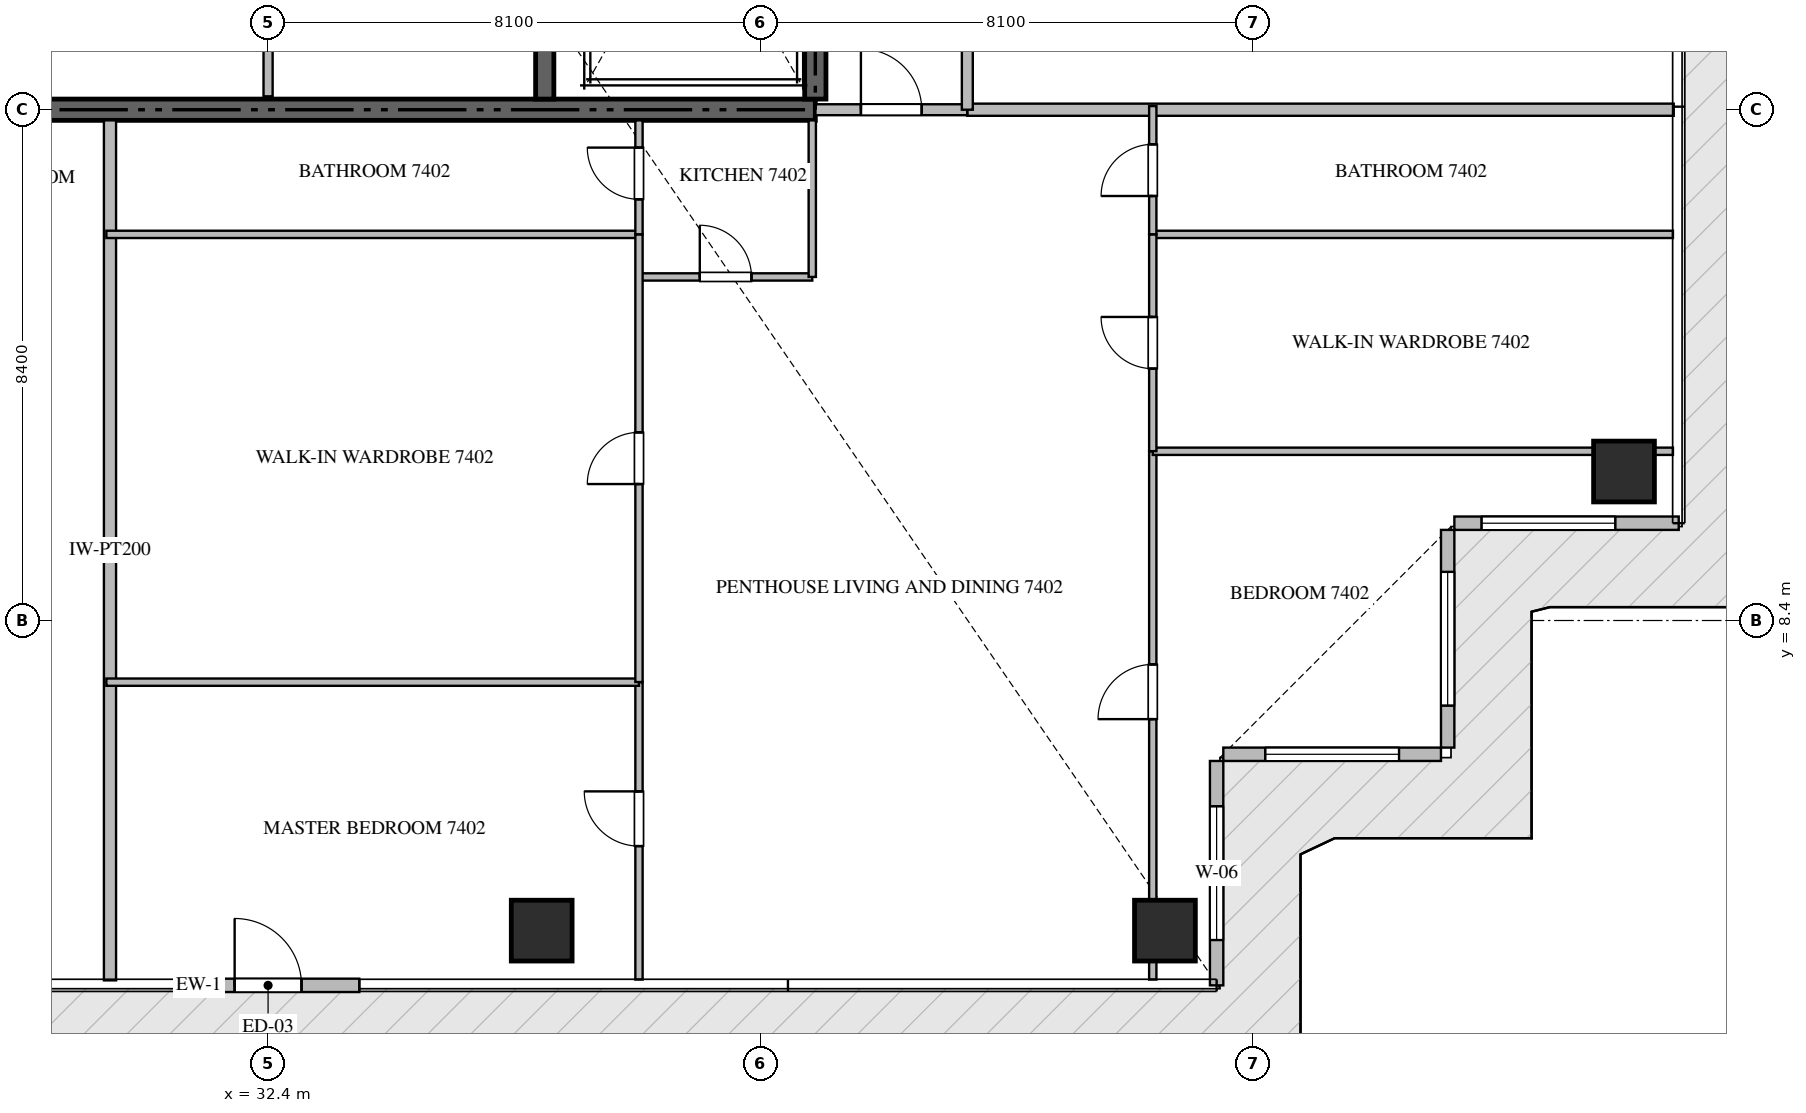
"""IFC4 building model, lengths in metres.
Left out: names, types, materials, properties, quantities, classifications, styles, units other than length and angle.
Written with IfcOpenShell. Run it as: python <this file> out.ifc"""

import sys

from ifc_helpers import new_model, si_unit, direction, frame, frame_2d, origin, origin_2d, place, context, subcontext, project, spatial, rectangle, extrude, source, transform, mapped, element, fill, save


model = new_model("IFC4")
c1 = context("Model", 3, precision=1e-05, world=origin(), true_north=direction((0.0, 1.0)))
c2 = subcontext(c1, "Body", "Model", "MODEL_VIEW")
j1 = project(units=[si_unit("LENGTHUNIT", "METRE"), si_unit("PLANEANGLEUNIT", "RADIAN")], contexts=[c1])
p1 = place(None, origin())
s1 = spatial("IfcSite", under=j1, at=p1, CompositionType="ELEMENT")
p2 = place(p1, origin())
s2 = spatial("IfcBuilding", under=s1, at=p2, CompositionType="ELEMENT")
p3 = place(p2, frame((0.0, 0.0, 297.5)))
s3 = spatial("IfcBuildingStorey", under=s2, at=p3, CompositionType="ELEMENT", Elevation=297.5)
p4 = place(p3, frame((23.4, 16.8, -0.26), z_axis=(0.0, 0.0, 1.0), x_axis=(1.0, 0.0, 0.0)))
e1 = element("IfcWall", 1, at=p4, inside=s3, PredefinedType="SHEAR", context=c2, shape_type="SweptSolid", body=[
    extrude(rectangle(XDim=18.0, YDim=0.35, at=frame_2d((9.0, 0.0))), origin(), (0.0, 0.0, 1.0), 4.048),
])
p5 = place(p3, frame((41.4, 16.975, -0.26), z_axis=(0.0, 0.0, 1.0), x_axis=(0.0, 1.0, 0.0)))
e2 = element("IfcWall", 2, at=p5, inside=s3, PredefinedType="SHEAR", context=c2, shape_type="SweptSolid", body=[
    extrude(rectangle(XDim=8.375, YDim=0.35, at=frame_2d((4.188, 0.0))), origin(), (0.0, 0.0, 1.0), 4.048),
])
p6 = place(p3, frame((36.95, 16.975, -0.26), z_axis=(0.0, 0.0, 1.0), x_axis=(0.0, 1.0, 0.0)))
e3 = element("IfcWall", 3, at=p6, inside=s3, PredefinedType="SHEAR", context=c2, shape_type="SweptSolid", body=[
    extrude(rectangle(XDim=8.375, YDim=0.3, at=frame_2d((4.188, 0.0))), origin(), (0.0, 0.0, 1.0), 4.048),
])
m1 = source(origin(), c2, "Body", "SweptSolid", [
    extrude(rectangle(XDim=1.0, YDim=1.0, at=origin_2d()), origin(), (0.0, 0.0, 1.0), 4.05),
])
for number, where, z_axis, x_axis in (
    (4, (36.9, 3.3, -0.26), (0.0, 0.0, 1.0), (1.0, 0.0, 0.0)),
    (5, (47.15, 3.3, -0.26), (0.0, 0.0, 1.0), (1.0, 0.0, 0.0)),
    (6, (54.7, 10.85, -0.26), (0.0, 0.0, 1.0), (1.0, 0.0, 0.0)),
):
    element("IfcColumn", number, at=place(p3, frame(where, z_axis=z_axis, x_axis=x_axis)), inside=s3, PredefinedType="COLUMN", context=c2, shape_type="MappedRepresentation", body=[
        mapped(m1, transform((0.0, 0.0, 0.0), scale=1.0)),
    ])
p7 = place(p3, frame((30.9, 2.4, 0.0), z_axis=(0.0, 0.0, 1.0), x_axis=(1.0, 0.0, 0.0)))
e7 = element("IfcWall", 7, at=p7, inside=s3, PredefinedType="ELEMENTEDWALL", context=c2, shape_type="SweptSolid", body=[
    extrude(rectangle(XDim=3.0, YDim=0.22, at=frame_2d((1.5, 0.0))), origin(), (0.0, 0.0, 1.0), 3.775),
])
p8 = place(p7, frame((0.95, 0.0, 0.0)))
e8 = element("IfcOpeningElement", 8, at=p8, cuts=e7, PredefinedType="OPENING", context=c2, shape_type="SweptSolid", body=[
    extrude(rectangle(XDim=1.1, YDim=2.2, at=frame_2d((0.55, 1.1))), frame((0.0, 0.12, 0.0), z_axis=(0.0, -1.0, 0.0), x_axis=(1.0, 0.0, 0.0)), (0.0, 0.0, 1.0), 0.24),
])
p9 = place(p3, frame((48.0, 2.4, 0.0), z_axis=(0.0, 0.0, 1.0), x_axis=(0.0, 1.0, 0.0)))
e9 = element("IfcWall", 9, at=p9, inside=s3, PredefinedType="ELEMENTEDWALL", context=c2, shape_type="SweptSolid", body=[
    extrude(rectangle(XDim=3.69, YDim=0.22, at=frame_2d((1.845, 0.0))), origin(), (0.0, 0.0, 1.0), 3.775),
])
p10 = place(p9, frame((0.745, 0.0, 0.65)))
e10 = element("IfcOpeningElement", 10, at=p10, cuts=e9, PredefinedType="OPENING", context=c2, shape_type="SweptSolid", body=[
    extrude(rectangle(XDim=2.2, YDim=2.4, at=frame_2d((1.1, 1.2))), frame((0.0, 0.12, 0.0), z_axis=(0.0, -1.0, 0.0), x_axis=(1.0, 0.0, 0.0)), (0.0, 0.0, 1.0), 0.24),
])
p11 = place(p3, frame((48.11, 6.2, 0.0), z_axis=(0.0, 0.0, 1.0), x_axis=(1.0, 0.0, 0.0)))
e11 = element("IfcWall", 11, at=p11, inside=s3, PredefinedType="ELEMENTEDWALL", context=c2, shape_type="SweptSolid", body=[
    extrude(rectangle(XDim=3.58, YDim=0.22, at=frame_2d((1.79, 0.0))), origin(), (0.0, 0.0, 1.0), 3.775),
])
p12 = place(p11, frame((0.69, 0.0, 0.65)))
e12 = element("IfcOpeningElement", 12, at=p12, cuts=e11, PredefinedType="OPENING", context=c2, shape_type="SweptSolid", body=[
    extrude(rectangle(XDim=2.2, YDim=2.4, at=frame_2d((1.1, 1.2))), frame((0.0, 0.12, 0.0), z_axis=(0.0, -1.0, 0.0), x_axis=(1.0, 0.0, 0.0)), (0.0, 0.0, 1.0), 0.24),
])
p13 = place(p3, frame((51.8, 6.31, 0.0), z_axis=(0.0, 0.0, 1.0), x_axis=(0.0, 1.0, 0.0)))
e13 = element("IfcWall", 13, at=p13, inside=s3, PredefinedType="ELEMENTEDWALL", context=c2, shape_type="SweptSolid", body=[
    extrude(rectangle(XDim=3.58, YDim=0.22, at=frame_2d((1.79, 0.0))), origin(), (0.0, 0.0, 1.0), 3.775),
])
p14 = place(p13, frame((0.69, 0.0, 0.65)))
e14 = element("IfcOpeningElement", 14, at=p14, cuts=e13, PredefinedType="OPENING", context=c2, shape_type="SweptSolid", body=[
    extrude(rectangle(XDim=2.2, YDim=2.4, at=frame_2d((1.1, 1.2))), frame((0.0, 0.12, 0.0), z_axis=(0.0, -1.0, 0.0), x_axis=(1.0, 0.0, 0.0)), (0.0, 0.0, 1.0), 0.24),
])
p15 = place(p3, frame((51.91, 10.0, 0.0), z_axis=(0.0, 0.0, 1.0), x_axis=(1.0, 0.0, 0.0)))
e15 = element("IfcWall", 15, at=p15, inside=s3, PredefinedType="ELEMENTEDWALL", context=c2, shape_type="SweptSolid", body=[
    extrude(rectangle(XDim=3.69, YDim=0.22, at=frame_2d((1.845, 0.0))), origin(), (0.0, 0.0, 1.0), 3.775),
])
p16 = place(p15, frame((0.447, 0.0, 0.65)))
e16 = element("IfcOpeningElement", 16, at=p16, cuts=e15, PredefinedType="OPENING", context=c2, shape_type="SweptSolid", body=[
    extrude(rectangle(XDim=2.2, YDim=2.4, at=frame_2d((1.1, 1.2))), frame((0.0, 0.12, 0.0), z_axis=(0.0, -1.0, 0.0), x_axis=(1.0, 0.0, 0.0)), (0.0, 0.0, 1.0), 0.24),
])
p17 = place(p3, frame((32.4, 17.02, 0.0), z_axis=(0.0, 0.0, 1.0), x_axis=(0.0, 1.0, 0.0)))
e17 = element("IfcWall", 17, at=p17, inside=s3, PredefinedType="PARTITIONING", context=c2, shape_type="SweptSolid", body=[
    extrude(rectangle(XDim=2.73, YDim=0.15, at=frame_2d((1.365, 0.0))), origin(), (0.0, 0.0, 1.0), 3.79),
])
p18 = place(p3, frame((29.8, 2.482, 0.0), z_axis=(0.0, 0.0, 1.0), x_axis=(0.0, 1.0, 0.0)))
e18 = element("IfcWall", 18, at=p18, inside=s3, PredefinedType="PARTITIONING", context=c2, shape_type="SweptSolid", body=[
    extrude(rectangle(XDim=14.143, YDim=0.2, at=frame_2d((7.072, 0.0))), origin(), (0.0, 0.0, 1.0), 3.79),
])
p19 = place(p3, frame((43.9, 16.8, 0.0), z_axis=(0.0, 0.0, 1.0), x_axis=(1.0, 0.0, 0.0)))
e19 = element("IfcWall", 19, at=p19, inside=s3, PredefinedType="PARTITIONING", context=c2, shape_type="SweptSolid", body=[
    extrude(rectangle(XDim=11.618, YDim=0.2, at=frame_2d((5.809, 0.0))), origin(), (0.0, 0.0, 1.0), 3.79),
])
p20 = place(p3, frame((41.402, 16.8, 0.0), z_axis=(0.0, 0.0, 1.0), x_axis=(1.0, 0.0, 0.0)))
e20 = element("IfcWall", 20, at=p20, inside=s3, PredefinedType="PARTITIONING", context=c2, shape_type="SweptSolid", body=[
    extrude(rectangle(XDim=2.496, YDim=0.18, at=frame_2d((1.248, 0.0))), origin(), (0.0, 0.0, 1.0), 3.79),
])
p21 = place(p20, frame((0.748, 0.0, 0.0)))
e21 = element("IfcOpeningElement", 21, at=p21, cuts=e20, PredefinedType="OPENING", context=c2, shape_type="SweptSolid", body=[
    extrude(rectangle(XDim=1.0, YDim=2.15, at=frame_2d((0.5, 1.075))), frame((0.0, 0.1, 0.0), z_axis=(0.0, -1.0, 0.0), x_axis=(1.0, 0.0, 0.0)), (0.0, 0.0, 1.0), 0.2),
])
p22 = place(p3, frame((43.9, 16.8, 0.0), z_axis=(0.0, 0.0, 1.0), x_axis=(0.0, 1.0, 0.0)))
e22 = element("IfcWall", 22, at=p22, inside=s3, PredefinedType="PARTITIONING", context=c2, shape_type="SweptSolid", body=[
    extrude(rectangle(XDim=16.8, YDim=0.18, at=frame_2d((8.4, 0.0))), origin(), (0.0, 0.0, 1.0), 3.79),
])
p23 = place(p22, frame((1.3, 0.0, 0.0)))
e23 = element("IfcOpeningElement", 23, at=p23, cuts=e22, PredefinedType="OPENING", context=c2, shape_type="SweptSolid", body=[
    extrude(rectangle(XDim=1.0, YDim=2.15, at=frame_2d((0.5, 1.075))), frame((0.0, 0.1, 0.0), z_axis=(0.0, -1.0, 0.0), x_axis=(1.0, 0.0, 0.0)), (0.0, 0.0, 1.0), 0.2),
])
p24 = place(p3, frame((38.5, 14.05, 0.0), z_axis=(0.0, 0.0, 1.0), x_axis=(1.0, 0.0, 0.0)))
e24 = element("IfcWall", 24, at=p24, inside=s3, PredefinedType="PARTITIONING", context=c2, shape_type="SweptSolid", body=[
    extrude(rectangle(XDim=2.85, YDim=0.12, at=frame_2d((1.425, 0.0))), origin(), (0.0, 0.0, 1.0), 3.79),
])
p25 = place(p24, frame((1.0, 0.0, 0.0)))
e25 = element("IfcOpeningElement", 25, at=p25, cuts=e24, PredefinedType="OPENING", context=c2, shape_type="SweptSolid", body=[
    extrude(rectangle(XDim=0.85, YDim=2.1, at=frame_2d((0.425, 1.05))), frame((0.0, 0.07, 0.0), z_axis=(0.0, -1.0, 0.0), x_axis=(1.0, 0.0, 0.0)), (0.0, 0.0, 1.0), 0.14),
])
p26 = place(p3, frame((41.35, 14.05, 0.0), z_axis=(0.0, 0.0, 1.0), x_axis=(0.0, 1.0, 0.0)))
e26 = element("IfcWall", 26, at=p26, inside=s3, PredefinedType="PARTITIONING", context=c2, shape_type="SweptSolid", body=[
    extrude(rectangle(XDim=2.575, YDim=0.12, at=frame_2d((1.288, 0.0))), origin(), (0.0, 0.0, 1.0), 3.79),
])
p27 = place(p3, frame((38.5, 2.495, 0.0), z_axis=(0.0, 0.0, 1.0), x_axis=(0.0, 1.0, 0.0)))
e27 = element("IfcWall", 27, at=p27, inside=s3, PredefinedType="PARTITIONING", context=c2, shape_type="SweptSolid", body=[
    extrude(rectangle(XDim=4.891, YDim=0.12, at=frame_2d((2.445, 0.0))), origin(), (0.0, 0.0, 1.0), 3.79),
])
p28 = place(p27, frame((2.195, 0.0, 0.0)))
e28 = element("IfcOpeningElement", 28, at=p28, cuts=e27, PredefinedType="OPENING", context=c2, shape_type="SweptSolid", body=[
    extrude(rectangle(XDim=0.9, YDim=2.1, at=frame_2d((0.45, 1.05))), frame((0.0, 0.07, 0.0), z_axis=(0.0, -1.0, 0.0), x_axis=(1.0, 0.0, 0.0)), (0.0, 0.0, 1.0), 0.14),
])
for number, where, z_axis, x_axis in (
    (29, (29.74, 7.386, 0.0), (0.0, 0.0, 1.0), (1.0, 0.0, 0.0)),
    (30, (29.74, 14.75, 0.0), (0.0, 0.0, 1.0), (1.0, 0.0, 0.0)),
):
    element("IfcWall", number, at=place(p3, frame(where, z_axis=z_axis, x_axis=x_axis)), inside=s3, PredefinedType="PARTITIONING", context=c2, shape_type="SweptSolid", body=[
        extrude(rectangle(XDim=8.76, YDim=0.12, at=frame_2d((4.38, 0.0))), origin(), (0.0, 0.0, 1.0), 3.79),
    ])
p29 = place(p3, frame((38.5, 7.388, 0.0), z_axis=(0.0, 0.0, 1.0), x_axis=(0.0, 1.0, 0.0)))
e31 = element("IfcWall", 31, at=p29, inside=s3, PredefinedType="PARTITIONING", context=c2, shape_type="SweptSolid", body=[
    extrude(rectangle(XDim=7.362, YDim=0.12, at=frame_2d((3.681, 0.0))), origin(), (0.0, 0.0, 1.0), 3.79),
])
p30 = place(p29, frame((3.256, 0.0, 0.0)))
e32 = element("IfcOpeningElement", 32, at=p30, cuts=e31, PredefinedType="OPENING", context=c2, shape_type="SweptSolid", body=[
    extrude(rectangle(XDim=0.85, YDim=2.1, at=frame_2d((0.425, 1.05))), frame((0.0, 0.07, 0.0), z_axis=(0.0, -1.0, 0.0), x_axis=(1.0, 0.0, 0.0)), (0.0, 0.0, 1.0), 0.14),
])
p31 = place(p3, frame((38.5, 14.752, 0.0), z_axis=(0.0, 0.0, 1.0), x_axis=(0.0, 1.0, 0.0)))
e33 = element("IfcWall", 33, at=p31, inside=s3, PredefinedType="PARTITIONING", context=c2, shape_type="SweptSolid", body=[
    extrude(rectangle(XDim=1.873, YDim=0.12, at=frame_2d((0.937, 0.0))), origin(), (0.0, 0.0, 1.0), 3.79),
])
p32 = place(p31, frame((0.575, 0.0, 0.0)))
e34 = element("IfcOpeningElement", 34, at=p32, cuts=e33, PredefinedType="OPENING", context=c2, shape_type="SweptSolid", body=[
    extrude(rectangle(XDim=0.85, YDim=2.1, at=frame_2d((0.425, 1.05))), frame((0.0, 0.07, 0.0), z_axis=(0.0, -1.0, 0.0), x_axis=(1.0, 0.0, 0.0)), (0.0, 0.0, 1.0), 0.14),
])
p33 = place(p3, frame((46.95, 2.495, 0.0), z_axis=(0.0, 0.0, 1.0), x_axis=(0.0, 1.0, 0.0)))
e35 = element("IfcWall", 35, at=p33, inside=s3, PredefinedType="PARTITIONING", context=c2, shape_type="SweptSolid", body=[
    extrude(rectangle(XDim=8.688, YDim=0.12, at=frame_2d((4.344, 0.0))), origin(), (0.0, 0.0, 1.0), 3.292),
])
p34 = place(p33, frame((4.283, 0.0, 0.0)))
e36 = element("IfcOpeningElement", 36, at=p34, cuts=e35, PredefinedType="OPENING", context=c2, shape_type="SweptSolid", body=[
    extrude(rectangle(XDim=0.9, YDim=2.1, at=frame_2d((0.45, 1.05))), frame((0.0, 0.07, 0.0), z_axis=(0.0, -1.0, 0.0), x_axis=(1.0, 0.0, 0.0)), (0.0, 0.0, 1.0), 0.14),
])
for number, where, z_axis, x_axis in (
    (37, (46.95, 11.183, 0.0), (0.0, 0.0, 1.0), (1.0, 0.0, 0.0)),
    (38, (46.95, 14.75, 0.0), (0.0, 0.0, 1.0), (1.0, 0.0, 0.0)),
):
    element("IfcWall", number, at=place(p3, frame(where, z_axis=z_axis, x_axis=x_axis)), inside=s3, PredefinedType="PARTITIONING", context=c2, shape_type="SweptSolid", body=[
        extrude(rectangle(XDim=8.555, YDim=0.12, at=frame_2d((4.277, 0.0))), origin(), (0.0, 0.0, 1.0), 3.79),
    ])
p35 = place(p3, frame((46.95, 11.185, 0.0), z_axis=(0.0, 0.0, 1.0), x_axis=(0.0, 1.0, 0.0)))
e39 = element("IfcWall", 39, at=p35, inside=s3, PredefinedType="PARTITIONING", context=c2, shape_type="SweptSolid", body=[
    extrude(rectangle(XDim=3.565, YDim=0.12, at=frame_2d((1.782, 0.0))), origin(), (0.0, 0.0, 1.0), 3.372),
])
p36 = place(p35, frame((1.357, 0.0, 0.0)))
e40 = element("IfcOpeningElement", 40, at=p36, cuts=e39, PredefinedType="OPENING", context=c2, shape_type="SweptSolid", body=[
    extrude(rectangle(XDim=0.85, YDim=2.1, at=frame_2d((0.425, 1.05))), frame((0.0, 0.07, 0.0), z_axis=(0.0, -1.0, 0.0), x_axis=(1.0, 0.0, 0.0)), (0.0, 0.0, 1.0), 0.14),
])
p37 = place(p3, frame((46.95, 14.752, 0.0), z_axis=(0.0, 0.0, 1.0), x_axis=(0.0, 1.0, 0.0)))
e41 = element("IfcWall", 41, at=p37, inside=s3, PredefinedType="PARTITIONING", context=c2, shape_type="SweptSolid", body=[
    extrude(rectangle(XDim=2.108, YDim=0.12, at=frame_2d((1.054, 0.0))), origin(), (0.0, 0.0, 1.0), 3.372),
])
p38 = place(p37, frame((0.629, 0.0, 0.0)))
e42 = element("IfcOpeningElement", 42, at=p38, cuts=e41, PredefinedType="OPENING", context=c2, shape_type="SweptSolid", body=[
    extrude(rectangle(XDim=0.85, YDim=2.1, at=frame_2d((0.425, 1.05))), frame((0.0, 0.07, 0.0), z_axis=(0.0, -1.0, 0.0), x_axis=(1.0, 0.0, 0.0)), (0.0, 0.0, 1.0), 0.14),
])
m2 = source(origin(), c2, "Body", "SweptSolid", [
    extrude(rectangle(XDim=1.1, YDim=2.2, at=frame_2d((0.55, 1.1))), frame((0.0, 0.025, 0.0), z_axis=(0.0, -1.0, 0.0), x_axis=(1.0, 0.0, 0.0)), (0.0, 0.0, 1.0), 0.05),
])
p39 = place(p8, origin())
e43 = element("IfcDoor", 43, at=p39, inside=s3, OperationType="SINGLE_SWING_LEFT", PredefinedType="DOOR", context=c2, shape_type="MappedRepresentation", body=[
    mapped(m2, transform((0.0, 0.0, 0.0), scale=1.0)),
])
fill(e8, e43)
m3 = source(origin(), c2, "Body", "SweptSolid", [
    extrude(rectangle(XDim=2.2, YDim=2.4, at=frame_2d((1.1, 1.2))), frame((0.0, 0.03, 0.0), z_axis=(0.0, -1.0, 0.0), x_axis=(1.0, 0.0, 0.0)), (0.0, 0.0, 1.0), 0.06),
])
p40 = place(p10, origin())
e44 = element("IfcWindow", 44, at=p40, inside=s3, PartitioningType="SINGLE_PANEL", PredefinedType="WINDOW", context=c2, shape_type="MappedRepresentation", body=[
    mapped(m3, transform((0.0, 0.0, 0.0), scale=1.0)),
])
fill(e10, e44)
p41 = place(p12, origin())
e45 = element("IfcWindow", 45, at=p41, inside=s3, PartitioningType="SINGLE_PANEL", PredefinedType="WINDOW", context=c2, shape_type="MappedRepresentation", body=[
    mapped(m3, transform((0.0, 0.0, 0.0), scale=1.0)),
])
fill(e12, e45)
p42 = place(p14, origin())
e46 = element("IfcWindow", 46, at=p42, inside=s3, PartitioningType="SINGLE_PANEL", PredefinedType="WINDOW", context=c2, shape_type="MappedRepresentation", body=[
    mapped(m3, transform((0.0, 0.0, 0.0), scale=1.0)),
])
fill(e14, e46)
p43 = place(p16, origin())
e47 = element("IfcWindow", 47, at=p43, inside=s3, PartitioningType="SINGLE_PANEL", PredefinedType="WINDOW", context=c2, shape_type="MappedRepresentation", body=[
    mapped(m3, transform((0.0, 0.0, 0.0), scale=1.0)),
])
fill(e16, e47)
m4 = source(origin(), c2, "Body", "SweptSolid", [
    extrude(rectangle(XDim=1.0, YDim=2.15, at=frame_2d((0.5, 1.075))), frame((0.0, 0.025, 0.0), z_axis=(0.0, -1.0, 0.0), x_axis=(1.0, 0.0, 0.0)), (0.0, 0.0, 1.0), 0.05),
])
p44 = place(p21, origin())
e48 = element("IfcDoor", 48, at=p44, inside=s3, OperationType="SINGLE_SWING_LEFT", PredefinedType="DOOR", context=c2, shape_type="MappedRepresentation", body=[
    mapped(m4, transform((0.0, 0.0, 0.0), scale=1.0)),
])
fill(e21, e48)
m5 = source(origin(), c2, "Body", "SweptSolid", [
    extrude(rectangle(XDim=0.85, YDim=2.1, at=frame_2d((0.425, 1.05))), frame((0.0, 0.025, 0.0), z_axis=(0.0, -1.0, 0.0), x_axis=(1.0, 0.0, 0.0)), (0.0, 0.0, 1.0), 0.05),
])
p45 = place(p25, origin())
e49 = element("IfcDoor", 49, at=p45, inside=s3, OperationType="SINGLE_SWING_LEFT", PredefinedType="DOOR", context=c2, shape_type="MappedRepresentation", body=[
    mapped(m5, transform((0.0, 0.0, 0.0), scale=1.0)),
])
fill(e25, e49)
m6 = source(origin(), c2, "Body", "SweptSolid", [
    extrude(rectangle(XDim=0.9, YDim=2.1, at=frame_2d((0.45, 1.05))), frame((0.0, 0.025, 0.0), z_axis=(0.0, -1.0, 0.0), x_axis=(1.0, 0.0, 0.0)), (0.0, 0.0, 1.0), 0.05),
])
p46 = place(p28, origin())
e50 = element("IfcDoor", 50, at=p46, inside=s3, OperationType="SINGLE_SWING_RIGHT", PredefinedType="DOOR", context=c2, shape_type="MappedRepresentation", body=[
    mapped(m6, transform((0.0, 0.0, 0.0), scale=1.0)),
])
fill(e28, e50)
p47 = place(p30, origin())
e51 = element("IfcDoor", 51, at=p47, inside=s3, OperationType="SINGLE_SWING_LEFT", PredefinedType="DOOR", context=c2, shape_type="MappedRepresentation", body=[
    mapped(m5, transform((0.0, 0.0, 0.0), scale=1.0)),
])
fill(e32, e51)
p48 = place(p32, origin())
e52 = element("IfcDoor", 52, at=p48, inside=s3, OperationType="SINGLE_SWING_RIGHT", PredefinedType="DOOR", context=c2, shape_type="MappedRepresentation", body=[
    mapped(m5, transform((0.0, 0.0, 0.0), scale=1.0)),
])
fill(e34, e52)
p49 = place(p34, origin())
e53 = element("IfcDoor", 53, at=p49, inside=s3, OperationType="SINGLE_SWING_LEFT", PredefinedType="DOOR", context=c2, shape_type="MappedRepresentation", body=[
    mapped(m6, transform((0.0, 0.0, 0.0), scale=1.0)),
])
fill(e36, e53)
p50 = place(p36, origin())
e54 = element("IfcDoor", 54, at=p50, inside=s3, OperationType="SINGLE_SWING_RIGHT", PredefinedType="DOOR", context=c2, shape_type="MappedRepresentation", body=[
    mapped(m5, transform((0.0, 0.0, 0.0), scale=1.0)),
])
fill(e40, e54)
p51 = place(p38, origin())
e55 = element("IfcDoor", 55, at=p51, inside=s3, OperationType="SINGLE_SWING_LEFT", PredefinedType="DOOR", context=c2, shape_type="MappedRepresentation", body=[
    mapped(m5, transform((0.0, 0.0, 0.0), scale=1.0)),
])
fill(e42, e55)
save(model, sys.argv[1])
